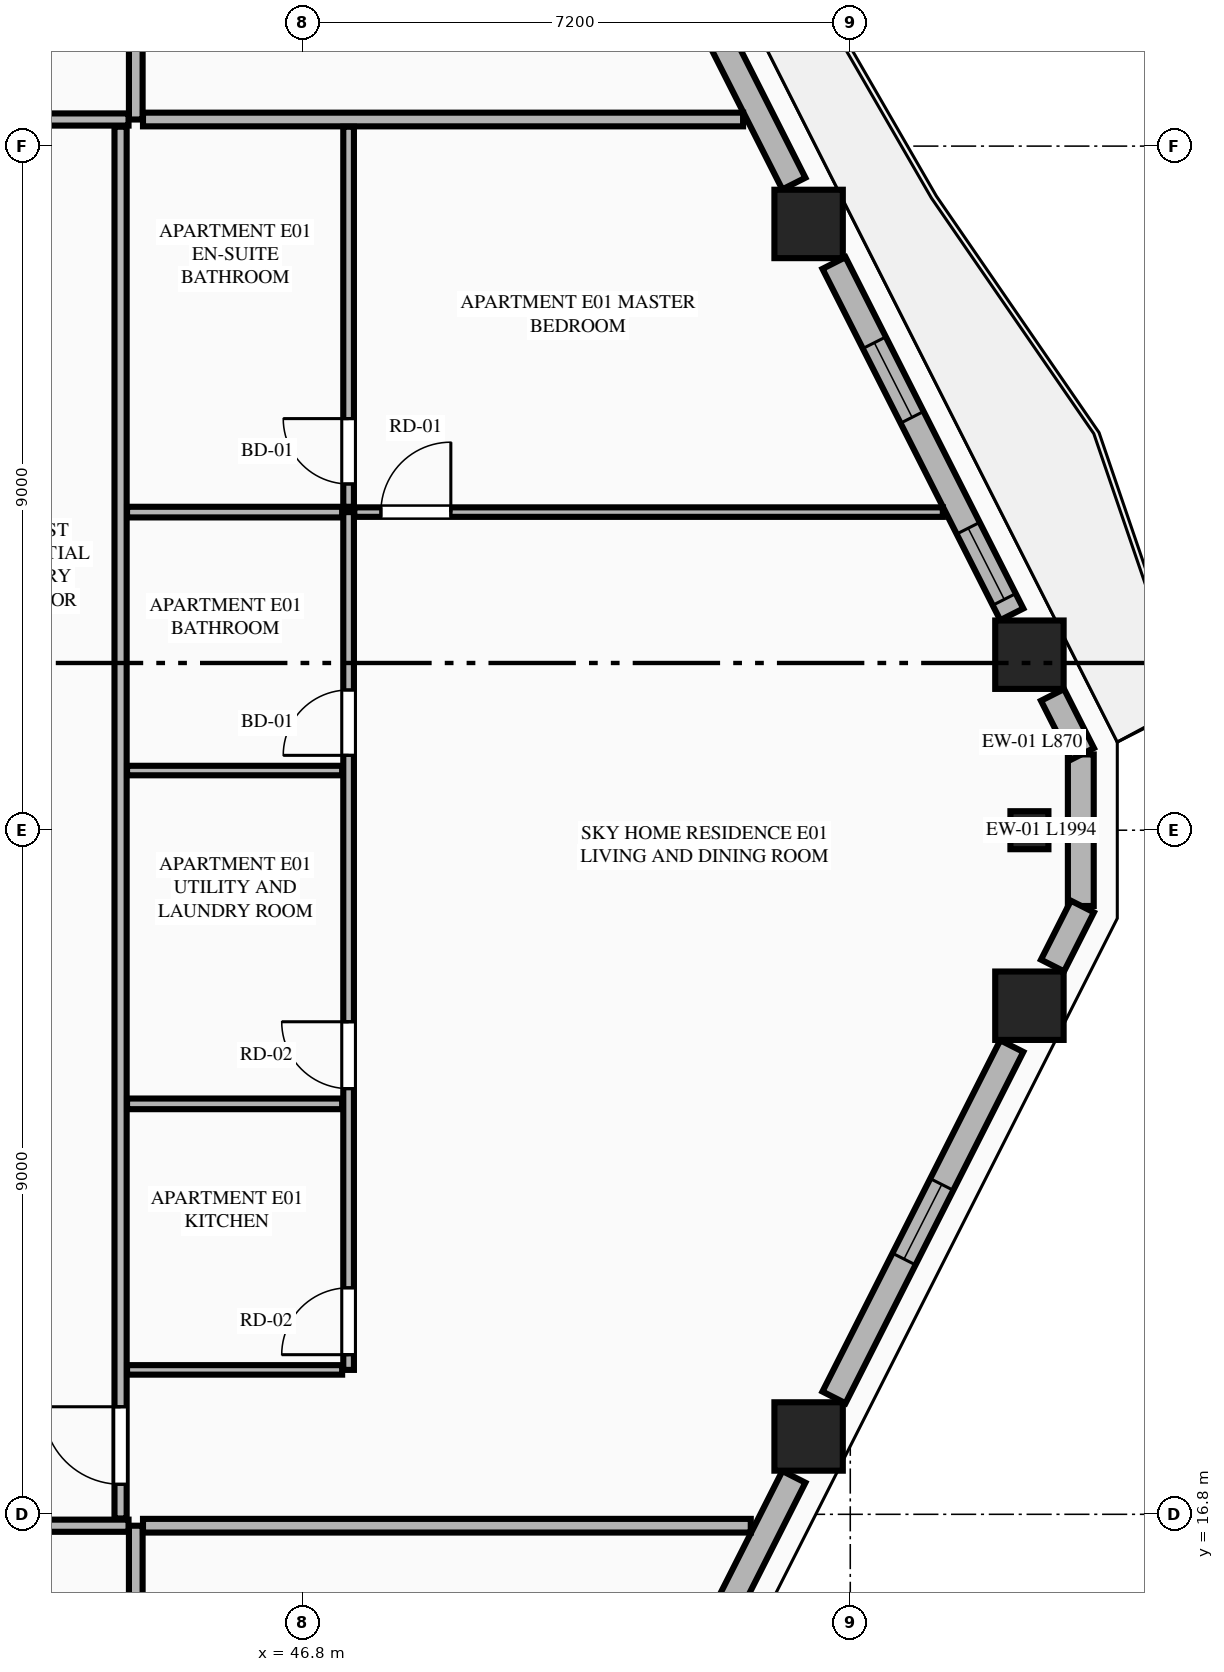
"""IFC4 building model, lengths in metres.
Left out: names, types, materials, properties, quantities, classifications, styles, units other than length and angle.
Written with IfcOpenShell. Run it as: python <this file> out.ifc"""

import sys

from ifc_helpers import new_model, si_unit, direction, frame, frame_2d, origin, origin_2d, place, context, subcontext, project, spatial, rectangle, extrude, element, fill, save


model = new_model("IFC4")
c1 = context("Model", 3, precision=1e-05, world=origin(), true_north=direction((0.0, 1.0)))
c2 = subcontext(c1, "Body", "Model", "MODEL_VIEW")
j1 = project(units=[si_unit("LENGTHUNIT", "METRE"), si_unit("PLANEANGLEUNIT", "RADIAN")], contexts=[c1])
p1 = place(None, origin())
s1 = spatial("IfcSite", under=j1, at=p1, CompositionType="ELEMENT")
p2 = place(p1, origin())
s2 = spatial("IfcBuilding", under=s1, at=p2, CompositionType="ELEMENT")
p3 = place(p2, frame((0.0, 0.0, 157.05)))
s3 = spatial("IfcBuildingStorey", under=s2, at=p3, CompositionType="ELEMENT", Elevation=157.05)
for number, where, z_axis, x_axis in (
    (1, (53.452, 17.824, 0.0), (0.0, 0.0, 1.0), (1.0, 0.0, 0.0)),
    (2, (56.357, 23.491, 0.0), (0.0, 0.0, 1.0), (1.0, 0.0, 0.0)),
    (3, (56.357, 28.109, 0.0), (0.0, 0.0, 1.0), (1.0, 0.0, 0.0)),
    (4, (53.452, 33.776, 0.0), (0.0, 0.0, 1.0), (1.0, 0.0, 0.0)),
):
    element("IfcColumn", number, at=place(p3, frame(where, z_axis=z_axis, x_axis=x_axis)), inside=s3, PredefinedType="COLUMN", context=c2, shape_type="SweptSolid", body=[
        extrude(rectangle(XDim=0.9, YDim=0.9, at=origin_2d()), origin(), (0.0, 0.0, 1.0), 3.55),
    ])
p4 = place(p3, frame((56.357, 25.8, 0.0), z_axis=(0.0, 0.0, 1.0), x_axis=(0.0, 1.0, 0.0)))
e5 = element("IfcColumn", 5, at=p4, inside=s3, PredefinedType="PILASTER", context=c2, shape_type="SweptSolid", body=[
    extrude(rectangle(XDim=0.5, YDim=0.35, at=origin_2d()), origin(), (0.0, 0.0, 1.0), 3.55),
])
p5 = place(p3, frame((57.033, 24.803, 0.0), z_axis=(0.0, 0.0, 1.0), x_axis=(0.0, 1.0, 0.0)))
e6 = element("IfcWall", 6, at=p5, inside=s3, PredefinedType="STANDARD", context=c2, shape_type="SweptSolid", body=[
    extrude(rectangle(XDim=1.994, YDim=0.34, at=frame_2d((0.997, 0.0))), origin(), (0.0, 0.0, 1.0), 3.34),
])
p6 = place(p3, frame((50.818, 12.471, 0.0), z_axis=(0.0, 0.0, 1.0), x_axis=(0.451491174807, 0.892275584711, 0.0)))
e7 = element("IfcWall", 7, at=p6, inside=s3, PredefinedType="STANDARD", context=c2, shape_type="SweptSolid", body=[
    extrude(rectangle(XDim=5.404, YDim=0.34, at=frame_2d((2.702, 0.0))), origin(), (0.0, 0.0, 1.0), 2.797),
])
p7 = place(p6, frame((2.152, 0.0, 0.75)))
e8 = element("IfcOpeningElement", 8, at=p7, cuts=e7, PredefinedType="OPENING", context=c2, shape_type="SweptSolid", body=[
    extrude(rectangle(XDim=1.1, YDim=1.897, at=frame_2d((0.55, 0.948))), frame((0.0, 0.18, 0.0), z_axis=(0.0, -1.0, 0.0), x_axis=(1.0, 0.0, 0.0)), (0.0, 0.0, 1.0), 0.36),
])
p8 = place(p3, frame((53.786, 18.338, 0.0), z_axis=(0.0, 0.0, 1.0), x_axis=(0.451544220963, 0.892248741392, 0.0)))
e9 = element("IfcWall", 9, at=p8, inside=s3, PredefinedType="STANDARD", context=c2, shape_type="SweptSolid", body=[
    extrude(rectangle(XDim=5.18, YDim=0.34, at=frame_2d((2.59, 0.0))), origin(), (0.0, 0.0, 1.0), 2.797),
])
p9 = place(p8, frame((2.04, 0.0, 0.75)))
e10 = element("IfcOpeningElement", 10, at=p9, cuts=e9, PredefinedType="OPENING", context=c2, shape_type="SweptSolid", body=[
    extrude(rectangle(XDim=1.1, YDim=1.897, at=frame_2d((0.55, 0.948))), frame((0.0, 0.18, 0.0), z_axis=(0.0, -1.0, 0.0), x_axis=(1.0, 0.0, 0.0)), (0.0, 0.0, 1.0), 0.36),
])
for number, where, z_axis, x_axis in (
    (11, (56.661, 24.02, 0.0), (0.0, 0.0, 1.0), (0.452, 0.892, 0.0)),
    (12, (57.054, 26.804, 0.0), (0.0, 0.0, 1.0), (-0.452, 0.892, 0.0)),
):
    element("IfcWall", number, at=place(p3, frame(where, z_axis=z_axis, x_axis=x_axis)), inside=s3, PredefinedType="STANDARD", context=c2, shape_type="SweptSolid", body=[
        extrude(rectangle(XDim=0.87, YDim=0.34, at=frame_2d((0.435, 0.0))), origin(), (0.0, 0.0, 1.0), 3.34),
    ])
p10 = place(p3, frame((56.125, 28.64, 0.0), z_axis=(0.0, 0.0, 1.0), x_axis=(-0.451544220963, 0.892248741392, 0.0)))
e13 = element("IfcWall", 13, at=p10, inside=s3, PredefinedType="STANDARD", context=c2, shape_type="SweptSolid", body=[
    extrude(rectangle(XDim=5.18, YDim=0.34, at=frame_2d((2.59, 0.0))), origin(), (0.0, 0.0, 1.0), 2.797),
])
p11 = place(p10, frame((0.22, 0.0, 0.75)))
e14 = element("IfcOpeningElement", 14, at=p11, cuts=e13, PredefinedType="OPENING", context=c2, shape_type="SweptSolid", body=[
    extrude(rectangle(XDim=1.05, YDim=1.897, at=frame_2d((0.525, 0.948))), frame((0.0, 0.18, 0.0), z_axis=(0.0, -1.0, 0.0), x_axis=(1.0, 0.0, 0.0)), (0.0, 0.0, 1.0), 0.36),
])
p12 = place(p10, frame((2.905, 0.0, 0.75)))
e15 = element("IfcOpeningElement", 15, at=p12, cuts=e13, PredefinedType="OPENING", context=c2, shape_type="SweptSolid", body=[
    extrude(rectangle(XDim=1.1, YDim=1.897, at=frame_2d((0.55, 0.948))), frame((0.0, 0.18, 0.0), z_axis=(0.0, -1.0, 0.0), x_axis=(1.0, 0.0, 0.0)), (0.0, 0.0, 1.0), 0.36),
])
p13 = place(p3, frame((53.258, 34.307, 0.0), z_axis=(0.0, 0.0, 1.0), x_axis=(-0.451491174807, 0.892275584711, 0.0)))
e16 = element("IfcWall", 16, at=p13, inside=s3, PredefinedType="STANDARD", context=c2, shape_type="SweptSolid", body=[
    extrude(rectangle(XDim=5.404, YDim=0.34, at=frame_2d((2.702, 0.0))), origin(), (0.0, 0.0, 1.0), 2.797),
])
p14 = place(p13, frame((2.749, 0.0, 0.0)))
e17 = element("IfcOpeningElement", 17, at=p14, cuts=e16, PredefinedType="OPENING", context=c2, shape_type="SweptSolid", body=[
    extrude(rectangle(XDim=1.1, YDim=2.25, at=frame_2d((0.55, 1.125))), frame((0.0, 0.18, 0.0), z_axis=(0.0, -1.0, 0.0), x_axis=(1.0, 0.0, 0.0)), (0.0, 0.0, 1.0), 0.36),
])
p15 = place(p3, frame((44.6, 4.105, 0.0), z_axis=(0.0, 0.0, 1.0), x_axis=(0.0, 1.0, 0.0)))
e18 = element("IfcWall", 18, at=p15, inside=s3, PredefinedType="PARTITIONING", context=c2, shape_type="SweptSolid", body=[
    extrude(rectangle(XDim=12.545, YDim=0.18, at=frame_2d((6.272, 0.0))), origin(), (0.0, 0.0, 1.0), 3.34),
])
p16 = place(p3, frame((36.327, 16.65, 0.0), z_axis=(0.0, 0.0, 1.0), x_axis=(1.0, 0.0, 0.0)))
e19 = element("IfcWall", 19, at=p16, inside=s3, PredefinedType="PARTITIONING", context=c2, shape_type="SweptSolid", body=[
    extrude(rectangle(XDim=8.178, YDim=0.16, at=frame_2d((4.089, 0.0))), origin(), (0.0, 0.0, 1.0), 3.34),
])
p17 = place(p16, frame((5.923, 0.0, 0.0)))
e20 = element("IfcOpeningElement", 20, at=p17, cuts=e19, PredefinedType="OPENING", context=c2, shape_type="SweptSolid", body=[
    extrude(rectangle(XDim=1.02, YDim=2.25, at=frame_2d((0.51, 1.125))), frame((0.0, 0.09, 0.0), z_axis=(0.0, -1.0, 0.0), x_axis=(1.0, 0.0, 0.0)), (0.0, 0.0, 1.0), 0.18),
])
p18 = place(p3, frame((44.6, 35.15, 0.0), z_axis=(0.0, 0.0, 1.0), x_axis=(0.0, 1.0, 0.0)))
e21 = element("IfcWall", 21, at=p18, inside=s3, PredefinedType="PARTITIONING", context=c2, shape_type="SweptSolid", body=[
    extrude(rectangle(XDim=12.345, YDim=0.18, at=frame_2d((6.173, 0.0))), origin(), (0.0, 0.0, 1.0), 3.34),
])
p19 = place(p3, frame((20.295, 35.15, 0.0), z_axis=(0.0, 0.0, 1.0), x_axis=(1.0, 0.0, 0.0)))
e22 = element("IfcWall", 22, at=p19, inside=s3, PredefinedType="PARTITIONING", context=c2, shape_type="SweptSolid", body=[
    extrude(rectangle(XDim=24.21, YDim=0.16, at=frame_2d((12.105, 0.0))), origin(), (0.0, 0.0, 1.0), 3.34),
])
p20 = place(p19, frame((0.405, 0.0, 0.0)))
e23 = element("IfcOpeningElement", 23, at=p20, cuts=e22, PredefinedType="OPENING", context=c2, shape_type="SweptSolid", body=[
    extrude(rectangle(XDim=1.35, YDim=2.35, at=frame_2d((0.675, 1.175))), frame((0.0, 0.09, 0.0), z_axis=(0.0, -1.0, 0.0), x_axis=(1.0, 0.0, 0.0)), (0.0, 0.0, 1.0), 0.18),
])
p21 = place(p3, frame((44.695, 16.65, 0.0), z_axis=(0.0, 0.0, 1.0), x_axis=(1.0, 0.0, 0.0)))
e24 = element("IfcWall", 24, at=p21, inside=s3, PredefinedType="PARTITIONING", context=c2, shape_type="SweptSolid", body=[
    extrude(rectangle(XDim=7.996, YDim=0.18, at=frame_2d((3.998, 0.0))), origin(), (0.0, 0.0, 1.0), 3.34),
])
p22 = place(p3, frame((44.695, 35.15, 0.0), z_axis=(0.0, 0.0, 1.0), x_axis=(1.0, 0.0, 0.0)))
e25 = element("IfcWall", 25, at=p22, inside=s3, PredefinedType="PARTITIONING", context=c2, shape_type="SweptSolid", body=[
    extrude(rectangle(XDim=7.895, YDim=0.18, at=frame_2d((3.948, 0.0))), origin(), (0.0, 0.0, 1.0), 3.34),
])
p23 = place(p3, frame((44.4, 16.745, 0.0), z_axis=(0.0, 0.0, 1.0), x_axis=(0.0, 1.0, 0.0)))
e26 = element("IfcWall", 26, at=p23, inside=s3, PredefinedType="PARTITIONING", context=c2, shape_type="SweptSolid", body=[
    extrude(rectangle(XDim=18.31, YDim=0.16, at=frame_2d((9.155, 0.0))), origin(), (0.0, 0.0, 1.0), 3.34),
])
p24 = place(p23, frame((0.45, 0.0, 0.0)))
e27 = element("IfcOpeningElement", 27, at=p24, cuts=e26, PredefinedType="OPENING", context=c2, shape_type="SweptSolid", body=[
    extrude(rectangle(XDim=1.02, YDim=2.25, at=frame_2d((0.51, 1.125))), frame((0.0, 0.09, 0.0), z_axis=(0.0, -1.0, 0.0), x_axis=(1.0, 0.0, 0.0)), (0.0, 0.0, 1.0), 0.18),
])
p25 = place(p3, frame((44.485, 18.7, 0.0), z_axis=(0.0, 0.0, 1.0), x_axis=(1.0, 0.0, 0.0)))
e28 = element("IfcWall", 28, at=p25, inside=s3, PredefinedType="PARTITIONING", context=c2, shape_type="SweptSolid", body=[
    extrude(rectangle(XDim=2.83, YDim=0.125, at=frame_2d((1.415, 0.0))), origin(), (0.0, 0.0, 1.0), 2.722),
])
p26 = place(p3, frame((47.4, 18.7, 0.0), z_axis=(0.0, 0.0, 1.0), x_axis=(0.0, 1.0, 0.0)))
e29 = element("IfcWall", 29, at=p26, inside=s3, PredefinedType="PLUMBINGWALL", context=c2, shape_type="SweptSolid", body=[
    extrude(rectangle(XDim=11.285, YDim=0.14, at=frame_2d((5.643, 0.0))), origin(), (0.0, 0.0, 1.0), 3.34),
])
p27 = place(p26, frame((0.2, 0.0, 0.0)))
e30 = element("IfcOpeningElement", 30, at=p27, cuts=e29, PredefinedType="OPENING", context=c2, shape_type="SweptSolid", body=[
    extrude(rectangle(XDim=0.88, YDim=2.15, at=frame_2d((0.44, 1.075))), frame((0.0, 0.08, 0.0), z_axis=(0.0, -1.0, 0.0), x_axis=(1.0, 0.0, 0.0)), (0.0, 0.0, 1.0), 0.16),
])
p28 = place(p26, frame((3.7, 0.0, 0.0)))
e31 = element("IfcOpeningElement", 31, at=p28, cuts=e29, PredefinedType="OPENING", context=c2, shape_type="SweptSolid", body=[
    extrude(rectangle(XDim=0.88, YDim=2.15, at=frame_2d((0.44, 1.075))), frame((0.0, 0.08, 0.0), z_axis=(0.0, -1.0, 0.0), x_axis=(1.0, 0.0, 0.0)), (0.0, 0.0, 1.0), 0.16),
])
p29 = place(p26, frame((8.085, 0.0, 0.0)))
e32 = element("IfcOpeningElement", 32, at=p29, cuts=e29, PredefinedType="OPENING", context=c2, shape_type="SweptSolid", body=[
    extrude(rectangle(XDim=0.86, YDim=2.1, at=frame_2d((0.43, 1.05))), frame((0.0, 0.08, 0.0), z_axis=(0.0, -1.0, 0.0), x_axis=(1.0, 0.0, 0.0)), (0.0, 0.0, 1.0), 0.16),
])
p30 = place(p3, frame((47.4, 30.055, 0.0), z_axis=(0.0, 0.0, 1.0), x_axis=(0.0, 1.0, 0.0)))
e33 = element("IfcWall", 33, at=p30, inside=s3, PredefinedType="PLUMBINGWALL", context=c2, shape_type="SweptSolid", body=[
    extrude(rectangle(XDim=5.0, YDim=0.14, at=frame_2d((2.5, 0.0))), origin(), (0.0, 0.0, 1.0), 3.34),
])
p31 = place(p30, frame((0.3, 0.0, 0.0)))
e34 = element("IfcOpeningElement", 34, at=p31, cuts=e33, PredefinedType="OPENING", context=c2, shape_type="SweptSolid", body=[
    extrude(rectangle(XDim=0.86, YDim=2.1, at=frame_2d((0.43, 1.05))), frame((0.0, 0.08, 0.0), z_axis=(0.0, -1.0, 0.0), x_axis=(1.0, 0.0, 0.0)), (0.0, 0.0, 1.0), 0.16),
])
p32 = place(p3, frame((44.485, 29.985, 0.0), z_axis=(0.0, 0.0, 1.0), x_axis=(1.0, 0.0, 0.0)))
e35 = element("IfcWall", 35, at=p32, inside=s3, PredefinedType="PLUMBINGWALL", context=c2, shape_type="SweptSolid", body=[
    extrude(rectangle(XDim=2.83, YDim=0.14, at=frame_2d((1.415, 0.0))), origin(), (0.0, 0.0, 1.0), 3.34),
])
p33 = place(p3, frame((47.475, 29.985, 0.0), z_axis=(0.0, 0.0, 1.0), x_axis=(1.0, 0.0, 0.0)))
e36 = element("IfcWall", 36, at=p33, inside=s3, PredefinedType="PARTITIONING", context=c2, shape_type="SweptSolid", body=[
    extrude(rectangle(XDim=7.743, YDim=0.125, at=frame_2d((3.872, 0.0))), origin(), (0.0, 0.0, 1.0), 3.34),
])
p34 = place(p33, frame((0.35, 0.0, 0.0)))
e37 = element("IfcOpeningElement", 37, at=p34, cuts=e36, PredefinedType="OPENING", context=c2, shape_type="SweptSolid", body=[
    extrude(rectangle(XDim=0.92, YDim=2.15, at=frame_2d((0.46, 1.075))), frame((0.0, 0.073, 0.0), z_axis=(0.0, -1.0, 0.0), x_axis=(1.0, 0.0, 0.0)), (0.0, 0.0, 1.0), 0.145),
])
p35 = place(p3, frame((44.485, 22.2, 0.0), z_axis=(0.0, 0.0, 1.0), x_axis=(1.0, 0.0, 0.0)))
e38 = element("IfcWall", 38, at=p35, inside=s3, PredefinedType="PLUMBINGWALL", context=c2, shape_type="SweptSolid", body=[
    extrude(rectangle(XDim=2.83, YDim=0.14, at=frame_2d((1.415, 0.0))), origin(), (0.0, 0.0, 1.0), 3.34),
])
p36 = place(p3, frame((44.485, 26.585, 0.0), z_axis=(0.0, 0.0, 1.0), x_axis=(1.0, 0.0, 0.0)))
e39 = element("IfcWall", 39, at=p36, inside=s3, PredefinedType="PARTITIONING", context=c2, shape_type="SweptSolid", body=[
    extrude(rectangle(XDim=2.83, YDim=0.125, at=frame_2d((1.415, 0.0))), origin(), (0.0, 0.0, 1.0), 3.34),
])
p37 = place(p9, origin())
e40 = element("IfcWindow", 40, at=p37, inside=s3, PartitioningType="SINGLE_PANEL", PredefinedType="WINDOW", context=c2, shape_type="SweptSolid", body=[
    extrude(rectangle(XDim=1.1, YDim=1.897, at=frame_2d((0.55, 0.948))), frame((0.0, 0.03, 0.0), z_axis=(0.0, -1.0, 0.0), x_axis=(1.0, 0.0, 0.0)), (0.0, 0.0, 1.0), 0.06),
])
fill(e10, e40)
p38 = place(p11, origin())
e41 = element("IfcWindow", 41, at=p38, inside=s3, PartitioningType="SINGLE_PANEL", PredefinedType="WINDOW", context=c2, shape_type="SweptSolid", body=[
    extrude(rectangle(XDim=1.05, YDim=1.897, at=frame_2d((0.525, 0.948))), frame((0.0, 0.03, 0.0), z_axis=(0.0, -1.0, 0.0), x_axis=(1.0, 0.0, 0.0)), (0.0, 0.0, 1.0), 0.06),
])
fill(e14, e41)
p39 = place(p27, origin())
e42 = element("IfcDoor", 42, at=p39, inside=s3, OperationType="SINGLE_SWING_LEFT", PredefinedType="DOOR", context=c2, shape_type="SweptSolid", body=[
    extrude(rectangle(XDim=0.88, YDim=2.15, at=frame_2d((0.44, 1.075))), frame((0.0, 0.025, 0.0), z_axis=(0.0, -1.0, 0.0), x_axis=(1.0, 0.0, 0.0)), (0.0, 0.0, 1.0), 0.05),
])
fill(e30, e42)
p40 = place(p28, origin())
e43 = element("IfcDoor", 43, at=p40, inside=s3, OperationType="SINGLE_SWING_RIGHT", PredefinedType="DOOR", context=c2, shape_type="SweptSolid", body=[
    extrude(rectangle(XDim=0.88, YDim=2.15, at=frame_2d((0.44, 1.075))), frame((0.0, 0.025, 0.0), z_axis=(0.0, -1.0, 0.0), x_axis=(1.0, 0.0, 0.0)), (0.0, 0.0, 1.0), 0.05),
])
fill(e31, e43)
p41 = place(p29, origin())
e44 = element("IfcDoor", 44, at=p41, inside=s3, OperationType="SINGLE_SWING_LEFT", PredefinedType="DOOR", context=c2, shape_type="SweptSolid", body=[
    extrude(rectangle(XDim=0.86, YDim=2.1, at=frame_2d((0.43, 1.05))), frame((0.0, 0.025, 0.0), z_axis=(0.0, -1.0, 0.0), x_axis=(1.0, 0.0, 0.0)), (0.0, 0.0, 1.0), 0.05),
])
fill(e32, e44)
p42 = place(p31, origin())
e45 = element("IfcDoor", 45, at=p42, inside=s3, OperationType="SINGLE_SWING_RIGHT", PredefinedType="DOOR", context=c2, shape_type="SweptSolid", body=[
    extrude(rectangle(XDim=0.86, YDim=2.1, at=frame_2d((0.43, 1.05))), frame((0.0, 0.025, 0.0), z_axis=(0.0, -1.0, 0.0), x_axis=(1.0, 0.0, 0.0)), (0.0, 0.0, 1.0), 0.05),
])
fill(e34, e45)
p43 = place(p24, origin())
e46 = element("IfcDoor", 46, at=p43, inside=s3, OperationType="SINGLE_SWING_RIGHT", PredefinedType="DOOR", context=c2, shape_type="SweptSolid", body=[
    extrude(rectangle(XDim=1.02, YDim=2.25, at=frame_2d((0.51, 1.125))), frame((0.0, 0.025, 0.0), z_axis=(0.0, -1.0, 0.0), x_axis=(1.0, 0.0, 0.0)), (0.0, 0.0, 1.0), 0.05),
])
fill(e27, e46)
p44 = place(p34, origin())
e47 = element("IfcDoor", 47, at=p44, inside=s3, OperationType="SINGLE_SWING_RIGHT", PredefinedType="DOOR", context=c2, shape_type="SweptSolid", body=[
    extrude(rectangle(XDim=0.92, YDim=2.15, at=frame_2d((0.46, 1.075))), frame((0.0, 0.025, 0.0), z_axis=(0.0, -1.0, 0.0), x_axis=(1.0, 0.0, 0.0)), (0.0, 0.0, 1.0), 0.05),
])
fill(e37, e47)
p45 = place(p12, origin())
e48 = element("IfcWindow", 48, at=p45, inside=s3, PartitioningType="SINGLE_PANEL", PredefinedType="WINDOW", context=c2, shape_type="SweptSolid", body=[
    extrude(rectangle(XDim=1.1, YDim=1.897, at=frame_2d((0.55, 0.948))), frame((0.0, 0.03, 0.0), z_axis=(0.0, -1.0, 0.0), x_axis=(1.0, 0.0, 0.0)), (0.0, 0.0, 1.0), 0.06),
])
fill(e15, e48)
save(model, sys.argv[1])
